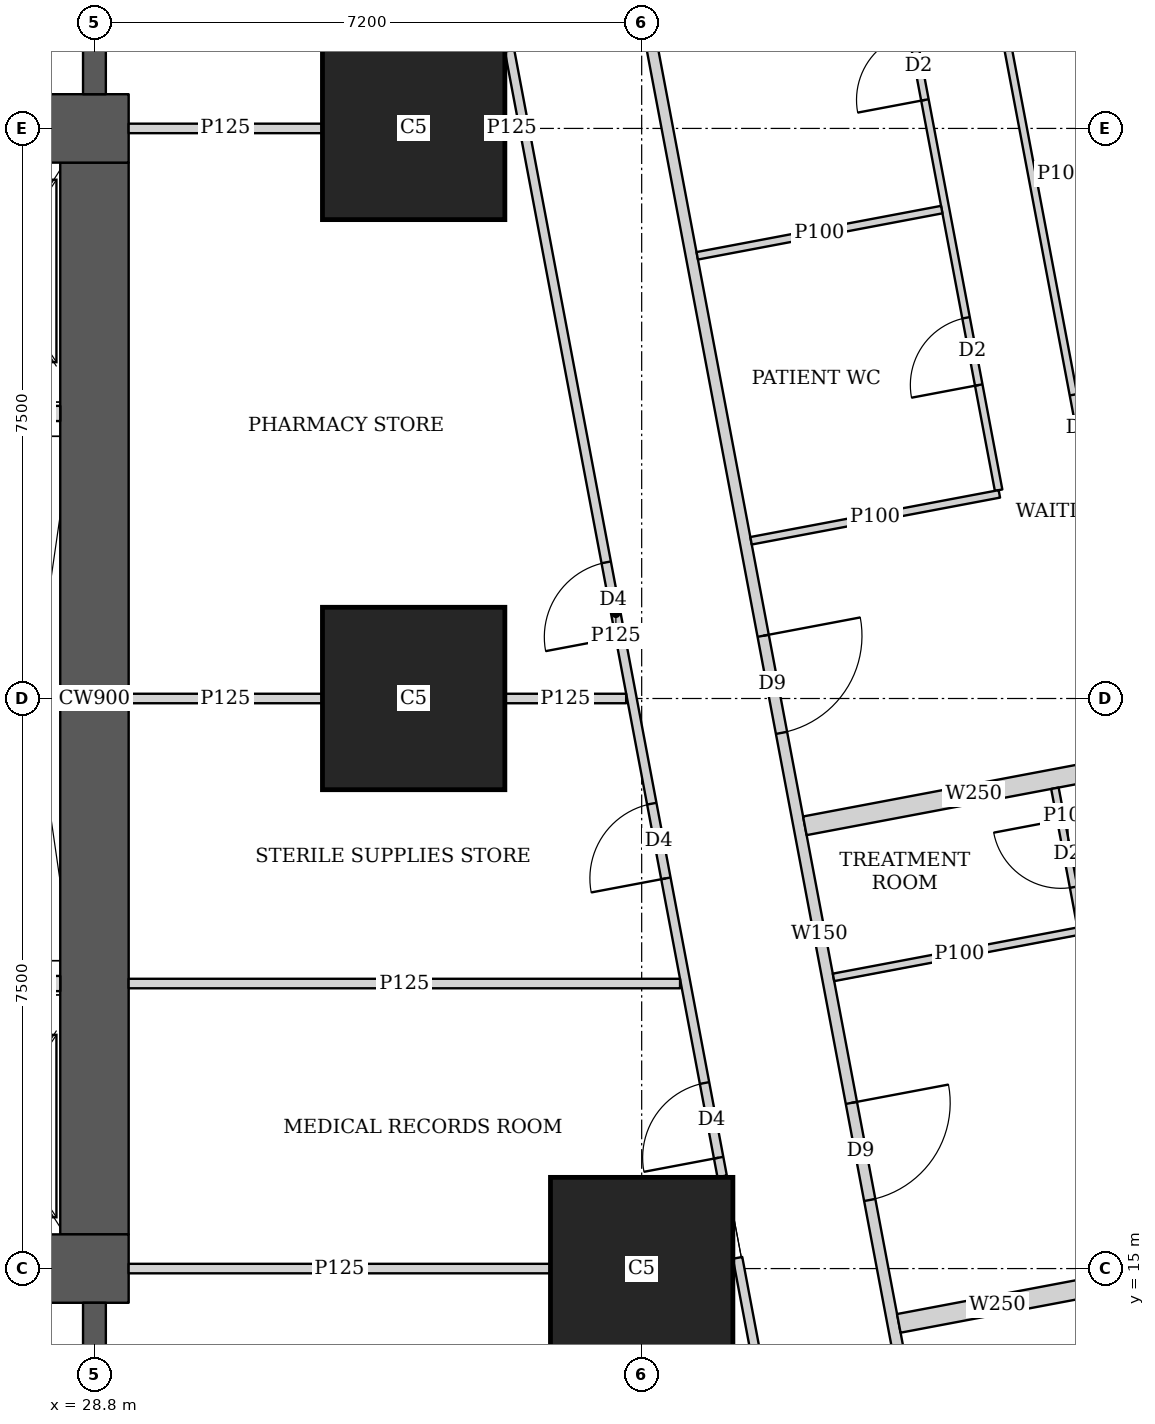
"""IFC4 building model, lengths in metres.
Left out: names, types, materials, properties, quantities, classifications, styles, units other than length and angle.
Written with IfcOpenShell. Run it as: python <this file> out.ifc"""

import sys

from ifc_helpers import new_model, si_unit, direction, frame, frame_2d, origin, origin_2d, place, context, subcontext, project, spatial, rectangle, extrude, element, fill, save


model = new_model("IFC4")
c1 = context("Model", 3, precision=1e-05, world=origin(), true_north=direction((0.0, 1.0)))
c2 = subcontext(c1, "Body", "Model", "MODEL_VIEW")
j1 = project(units=[si_unit("LENGTHUNIT", "METRE"), si_unit("PLANEANGLEUNIT", "RADIAN")], contexts=[c1])
p1 = place(None, origin())
s1 = spatial("IfcSite", under=j1, at=p1, CompositionType="ELEMENT")
p2 = place(p1, origin())
s2 = spatial("IfcBuilding", under=s1, at=p2, CompositionType="ELEMENT")
p3 = place(p2, frame((0.0, 0.0, 10.1)))
s3 = spatial("IfcBuildingStorey", under=s2, at=p3, CompositionType="ELEMENT", Elevation=10.1)
for number, where, z_axis, x_axis in (
    (1, (36.0, 15.0, 0.0), (0.0, 0.0, 1.0), (1.0, 0.0, 0.0)),
    (2, (33.0, 22.5, 0.0), (0.0, 0.0, 1.0), (1.0, 0.0, 0.0)),
    (3, (33.0, 30.0, 0.0), (0.0, 0.0, 1.0), (1.0, 0.0, 0.0)),
):
    element("IfcColumn", number, at=place(p3, frame(where, z_axis=z_axis, x_axis=x_axis)), inside=s3, PredefinedType="COLUMN", context=c2, shape_type="SweptSolid", body=[
        extrude(rectangle(XDim=2.4, YDim=2.4, at=origin_2d()), origin(), (0.0, 0.0, 1.0), 4.5),
    ])
p4 = place(p3, frame((13.95, 15.0, 0.0), z_axis=(0.0, 0.0, 1.0), x_axis=(1.0, 0.0, 0.0)))
e4 = element("IfcWall", 4, at=p4, inside=s3, PredefinedType="SHEAR", context=c2, shape_type="SweptSolid", body=[
    extrude(rectangle(XDim=15.3, YDim=0.9, at=frame_2d((7.65, 0.0))), origin(), (0.0, 0.0, 1.0), 4.5),
])
p5 = place(p4, frame((4.45, 0.0, 0.0)))
e5 = element("IfcOpeningElement", 5, at=p5, cuts=e4, PredefinedType="OPENING", context=c2, shape_type="SweptSolid", body=[
    extrude(rectangle(XDim=1.8, YDim=2.1, at=frame_2d((0.9, 1.05))), frame((0.0, 0.46, 0.0), z_axis=(0.0, -1.0, 0.0), x_axis=(1.0, 0.0, 0.0)), (0.0, 0.0, 1.0), 0.92),
])
p6 = place(p4, frame((10.7, 0.0, 0.0)))
e6 = element("IfcOpeningElement", 6, at=p6, cuts=e4, PredefinedType="OPENING", context=c2, shape_type="SweptSolid", body=[
    extrude(rectangle(XDim=1.1, YDim=2.1, at=frame_2d((0.55, 1.05))), frame((0.0, 0.46, 0.0), z_axis=(0.0, -1.0, 0.0), x_axis=(1.0, 0.0, 0.0)), (0.0, 0.0, 1.0), 0.92),
])
p7 = place(p3, frame((13.95, 30.0, 0.0), z_axis=(0.0, 0.0, 1.0), x_axis=(1.0, 0.0, 0.0)))
e7 = element("IfcWall", 7, at=p7, inside=s3, PredefinedType="SHEAR", context=c2, shape_type="SweptSolid", body=[
    extrude(rectangle(XDim=15.3, YDim=0.9, at=frame_2d((7.65, 0.0))), origin(), (0.0, 0.0, 1.0), 4.5),
])
p8 = place(p7, frame((4.45, 0.0, 0.0)))
e8 = element("IfcOpeningElement", 8, at=p8, cuts=e7, PredefinedType="OPENING", context=c2, shape_type="SweptSolid", body=[
    extrude(rectangle(XDim=1.8, YDim=2.1, at=frame_2d((0.9, 1.05))), frame((0.0, 0.46, 0.0), z_axis=(0.0, -1.0, 0.0), x_axis=(1.0, 0.0, 0.0)), (0.0, 0.0, 1.0), 0.92),
])
p9 = place(p7, frame((10.7, 0.0, 0.0)))
e9 = element("IfcOpeningElement", 9, at=p9, cuts=e7, PredefinedType="OPENING", context=c2, shape_type="SweptSolid", body=[
    extrude(rectangle(XDim=1.1, YDim=2.1, at=frame_2d((0.55, 1.05))), frame((0.0, 0.46, 0.0), z_axis=(0.0, -1.0, 0.0), x_axis=(1.0, 0.0, 0.0)), (0.0, 0.0, 1.0), 0.92),
])
p10 = place(p3, frame((28.8, 15.45, 0.0), z_axis=(0.0, 0.0, 1.0), x_axis=(0.0, 1.0, 0.0)))
e10 = element("IfcWall", 10, at=p10, inside=s3, PredefinedType="SHEAR", context=c2, shape_type="SweptSolid", body=[
    extrude(rectangle(XDim=14.1, YDim=0.9, at=frame_2d((7.05, 0.0))), origin(), (0.0, 0.0, 1.0), 4.5),
])
for number, where, z_axis, x_axis in (
    (11, (28.8, 10.35, 0.0), (0.0, 0.0, 1.0), (0.0, 1.0, 0.0)),
    (12, (28.8, 30.45, 0.0), (0.0, 0.0, 1.0), (0.0, 1.0, 0.0)),
):
    element("IfcWall", number, at=place(p3, frame(where, z_axis=z_axis, x_axis=x_axis)), inside=s3, PredefinedType="SHEAR", context=c2, shape_type="SweptSolid", body=[
        extrude(rectangle(XDim=4.2, YDim=0.3, at=frame_2d((2.1, 0.0))), origin(), (0.0, 0.0, 1.0), 4.5),
    ])
p11 = place(p3, frame((35.151, 36.285, 0.0), z_axis=(0.0, 0.0, 1.0), x_axis=(0.18558085056, -0.982628998099, 0.0)))
e13 = element("IfcWall", 13, at=p11, inside=s3, PredefinedType="SOLIDWALL", context=c2, shape_type="SweptSolid", body=[
    extrude(rectangle(XDim=34.352, YDim=0.15, at=frame_2d((17.176, 0.0))), origin(), (0.0, 0.0, 1.0), 2.4),
])
p12 = place(p11, frame((13.189, 0.0, 0.0)))
e14 = element("IfcOpeningElement", 14, at=p12, cuts=e13, PredefinedType="OPENING", context=c2, shape_type="SweptSolid", body=[
    extrude(rectangle(XDim=1.3, YDim=2.1, at=frame_2d((0.65, 1.05))), frame((0.0, 0.085, 0.0), z_axis=(0.0, -1.0, 0.0), x_axis=(1.0, 0.0, 0.0)), (0.0, 0.0, 1.0), 0.17),
])
p13 = place(p11, frame((19.443, 0.0, 0.0)))
e15 = element("IfcOpeningElement", 15, at=p13, cuts=e13, PredefinedType="OPENING", context=c2, shape_type="SweptSolid", body=[
    extrude(rectangle(XDim=1.3, YDim=2.1, at=frame_2d((0.65, 1.05))), frame((0.0, 0.085, 0.0), z_axis=(0.0, -1.0, 0.0), x_axis=(1.0, 0.0, 0.0)), (0.0, 0.0, 1.0), 0.17),
])
p14 = place(p11, frame((25.444, 0.0, 0.0)))
e16 = element("IfcOpeningElement", 16, at=p14, cuts=e13, PredefinedType="OPENING", context=c2, shape_type="SweptSolid", body=[
    extrude(rectangle(XDim=1.3, YDim=2.1, at=frame_2d((0.65, 1.05))), frame((0.0, 0.085, 0.0), z_axis=(0.0, -1.0, 0.0), x_axis=(1.0, 0.0, 0.0)), (0.0, 0.0, 1.0), 0.17),
])
p15 = place(p3, frame((38.956, 40.92, 0.0), z_axis=(0.0, 0.0, 1.0), x_axis=(0.185636914727, -0.982618408077, 0.0)))
e17 = element("IfcWall", 17, at=p15, inside=s3, PredefinedType="PARTITIONING", context=c2, shape_type="SweptSolid", body=[
    extrude(rectangle(XDim=15.729, YDim=0.1, at=frame_2d((7.865, 0.0))), origin(), (0.0, 0.0, 1.0), 2.6),
])
p16 = place(p15, frame((14.679, 0.0, 0.0)))
e18 = element("IfcOpeningElement", 18, at=p16, cuts=e17, PredefinedType="OPENING", context=c2, shape_type="SweptSolid", body=[
    extrude(rectangle(XDim=0.9, YDim=2.1, at=frame_2d((0.45, 1.05))), frame((0.0, 0.06, 0.0), z_axis=(0.0, -1.0, 0.0), x_axis=(1.0, 0.0, 0.0)), (0.0, 0.0, 1.0), 0.12),
])
p17 = place(p15, frame((9.0, 0.0, 0.0)))
e19 = element("IfcOpeningElement", 19, at=p17, cuts=e17, PredefinedType="OPENING", context=c2, shape_type="SweptSolid", body=[
    extrude(rectangle(XDim=0.9, YDim=2.1, at=frame_2d((0.45, 1.05))), frame((0.0, 0.06, 0.0), z_axis=(0.0, -1.0, 0.0), x_axis=(1.0, 0.0, 0.0)), (0.0, 0.0, 1.0), 0.12),
])
p18 = place(p15, frame((3.231, 0.0, 0.0)))
e20 = element("IfcOpeningElement", 20, at=p18, cuts=e17, PredefinedType="OPENING", context=c2, shape_type="SweptSolid", body=[
    extrude(rectangle(XDim=0.9, YDim=2.1, at=frame_2d((0.45, 1.05))), frame((0.0, 0.06, 0.0), z_axis=(0.0, -1.0, 0.0), x_axis=(1.0, 0.0, 0.0)), (0.0, 0.0, 1.0), 0.12),
])
p19 = place(p3, frame((36.842, 45.65, 0.0), z_axis=(0.0, 0.0, 1.0), x_axis=(0.185559483963, -0.982633033188, 0.0)))
e21 = element("IfcWall", 21, at=p19, inside=s3, PredefinedType="PARTITIONING", context=c2, shape_type="SweptSolid", body=[
    extrude(rectangle(XDim=20.77, YDim=0.1, at=frame_2d((10.385, 0.0))), origin(), (0.0, 0.0, 1.0), 2.4),
])
p20 = place(p19, frame((18.462, 0.0, 0.0)))
e22 = element("IfcOpeningElement", 22, at=p20, cuts=e21, PredefinedType="OPENING", context=c2, shape_type="SweptSolid", body=[
    extrude(rectangle(XDim=0.9, YDim=2.1, at=frame_2d((0.45, 1.05))), frame((0.0, 0.06, 0.0), z_axis=(0.0, -1.0, 0.0), x_axis=(1.0, 0.0, 0.0)), (0.0, 0.0, 1.0), 0.12),
])
p21 = place(p19, frame((14.645, 0.0, 0.0)))
e23 = element("IfcOpeningElement", 23, at=p21, cuts=e21, PredefinedType="OPENING", context=c2, shape_type="SweptSolid", body=[
    extrude(rectangle(XDim=0.9, YDim=2.1, at=frame_2d((0.45, 1.05))), frame((0.0, 0.06, 0.0), z_axis=(0.0, -1.0, 0.0), x_axis=(1.0, 0.0, 0.0)), (0.0, 0.0, 1.0), 0.12),
])
p22 = place(p19, frame((5.655, 0.0, 0.0)))
e24 = element("IfcOpeningElement", 24, at=p22, cuts=e21, PredefinedType="OPENING", context=c2, shape_type="SweptSolid", body=[
    extrude(rectangle(XDim=0.9, YDim=2.1, at=frame_2d((0.45, 1.05))), frame((0.0, 0.06, 0.0), z_axis=(0.0, -1.0, 0.0), x_axis=(1.0, 0.0, 0.0)), (0.0, 0.0, 1.0), 0.12),
])
p23 = place(p3, frame((41.87, 29.459, 0.0), z_axis=(0.0, 0.0, 1.0), x_axis=(-0.982722777639, -0.185083608972, 0.0)))
e25 = element("IfcWall", 25, at=p23, inside=s3, PredefinedType="PARTITIONING", context=c2, shape_type="SweptSolid", body=[
    extrude(rectangle(XDim=0.686, YDim=0.1, at=frame_2d((0.343, 0.0))), origin(), (0.0, 0.0, 1.0), 2.6),
])
p24 = place(p3, frame((39.948, 28.932, 0.0), z_axis=(0.0, 0.0, 1.0), x_axis=(-0.982610347627, -0.185679575441, 0.0)))
e26 = element("IfcWall", 26, at=p24, inside=s3, PredefinedType="PARTITIONING", context=c2, shape_type="SweptSolid", body=[
    extrude(rectangle(XDim=3.274, YDim=0.1, at=frame_2d((1.637, 0.0))), origin(), (0.0, 0.0, 1.0), 2.6),
])
p25 = place(p3, frame((40.706, 25.192, 0.0), z_axis=(0.0, 0.0, 1.0), x_axis=(-0.982633623707, -0.185556356831, 0.0)))
e27 = element("IfcWall", 27, at=p25, inside=s3, PredefinedType="PARTITIONING", context=c2, shape_type="SweptSolid", body=[
    extrude(rectangle(XDim=3.325, YDim=0.1, at=frame_2d((1.663, 0.0))), origin(), (0.0, 0.0, 1.0), 4.2),
])
p26 = place(p3, frame((41.437, 21.319, 0.0), z_axis=(0.0, 0.0, 1.0), x_axis=(0.186029078128, -0.982544239254, 0.0)))
e28 = element("IfcWall", 28, at=p26, inside=s3, PredefinedType="PARTITIONING", context=c2, shape_type="SweptSolid", body=[
    extrude(rectangle(XDim=1.854, YDim=0.1, at=frame_2d((0.927, 0.0))), origin(), (0.0, 0.0, 1.0), 4.2),
])
p27 = place(p26, frame((0.424, 0.0, 0.0)))
e29 = element("IfcOpeningElement", 29, at=p27, cuts=e28, PredefinedType="OPENING", context=c2, shape_type="SweptSolid", body=[
    extrude(rectangle(XDim=0.9, YDim=2.1, at=frame_2d((0.45, 1.05))), frame((0.0, 0.06, 0.0), z_axis=(0.0, -1.0, 0.0), x_axis=(1.0, 0.0, 0.0)), (0.0, 0.0, 1.0), 0.12),
])
p28 = place(p3, frame((41.84, 19.457, 0.0), z_axis=(0.0, 0.0, 1.0), x_axis=(-0.98264623159, -0.185489577987, 0.0)))
e30 = element("IfcWall", 30, at=p28, inside=s3, PredefinedType="PARTITIONING", context=c2, shape_type="SweptSolid", body=[
    extrude(rectangle(XDim=3.375, YDim=0.1, at=frame_2d((1.688, 0.0))), origin(), (0.0, 0.0, 1.0), 4.2),
])
p29 = place(p3, frame((42.593, 21.665, 0.0), z_axis=(0.0, 0.0, 1.0), x_axis=(-0.982612837616, -0.185666398014, 0.0)))
e31 = element("IfcWall", 31, at=p29, inside=s3, PredefinedType="SOLIDWALL", context=c2, shape_type="SweptSolid", body=[
    extrude(rectangle(XDim=4.525, YDim=0.25, at=frame_2d((2.262, 0.0))), origin(), (0.0, 0.0, 1.0), 2.6),
])
p30 = place(p3, frame((41.976, 14.769, 0.0), z_axis=(0.0, 0.0, 1.0), x_axis=(-0.982610412957, -0.185679229715, 0.0)))
e32 = element("IfcWall", 32, at=p30, inside=s3, PredefinedType="SOLIDWALL", context=c2, shape_type="SweptSolid", body=[
    extrude(rectangle(XDim=2.639, YDim=0.25, at=frame_2d((1.319, 0.0))), origin(), (0.0, 0.0, 1.0), 2.6),
])
p31 = place(p3, frame((38.202, 10.163, 0.0), z_axis=(0.0, 0.0, 1.0), x_axis=(-0.185539561605, 0.982636795097, 0.0)))
e33 = element("IfcWall", 33, at=p31, inside=s3, PredefinedType="PARTITIONING", context=c2, shape_type="SweptSolid", body=[
    extrude(rectangle(XDim=5.066, YDim=0.125, at=frame_2d((2.533, 0.0))), origin(), (0.0, 0.0, 1.0), 2.6),
])
p32 = place(p31, frame((0.708, 0.0, 0.0)))
e34 = element("IfcOpeningElement", 34, at=p32, cuts=e33, PredefinedType="OPENING", context=c2, shape_type="SweptSolid", body=[
    extrude(rectangle(XDim=1.0, YDim=2.1, at=frame_2d((0.5, 1.05))), frame((0.0, 0.073, 0.0), z_axis=(0.0, -1.0, 0.0), x_axis=(1.0, 0.0, 0.0)), (0.0, 0.0, 1.0), 0.145),
])
p33 = place(p3, frame((37.059, 16.213, 0.0), z_axis=(0.0, 0.0, 1.0), x_axis=(-0.185585225745, 0.982628171785, 0.0)))
e35 = element("IfcWall", 35, at=p33, inside=s3, PredefinedType="PARTITIONING", context=c2, shape_type="SweptSolid", body=[
    extrude(rectangle(XDim=15.072, YDim=0.125, at=frame_2d((7.536, 0.0))), origin(), (0.0, 0.0, 1.0), 2.6),
])
p34 = place(p33, frame((7.221, 0.0, 0.0)))
e36 = element("IfcOpeningElement", 36, at=p34, cuts=e35, PredefinedType="OPENING", context=c2, shape_type="SweptSolid", body=[
    extrude(rectangle(XDim=1.0, YDim=2.1, at=frame_2d((0.5, 1.05))), frame((0.0, 0.073, 0.0), z_axis=(0.0, -1.0, 0.0), x_axis=(1.0, 0.0, 0.0)), (0.0, 0.0, 1.0), 0.145),
])
p35 = place(p33, frame((0.25, 0.0, 0.0)))
e37 = element("IfcOpeningElement", 37, at=p35, cuts=e35, PredefinedType="OPENING", context=c2, shape_type="SweptSolid", body=[
    extrude(rectangle(XDim=1.0, YDim=2.1, at=frame_2d((0.5, 1.05))), frame((0.0, 0.073, 0.0), z_axis=(0.0, -1.0, 0.0), x_axis=(1.0, 0.0, 0.0)), (0.0, 0.0, 1.0), 0.145),
])
p36 = place(p33, frame((3.99, 0.0, 0.0)))
e38 = element("IfcOpeningElement", 38, at=p36, cuts=e35, PredefinedType="OPENING", context=c2, shape_type="SweptSolid", body=[
    extrude(rectangle(XDim=1.0, YDim=2.1, at=frame_2d((0.5, 1.05))), frame((0.0, 0.073, 0.0), z_axis=(0.0, -1.0, 0.0), x_axis=(1.0, 0.0, 0.0)), (0.0, 0.0, 1.0), 0.145),
])
p37 = place(p3, frame((29.25, 15.0, 0.0), z_axis=(0.0, 0.0, 1.0), x_axis=(1.0, 0.0, 0.0)))
e39 = element("IfcWall", 39, at=p37, inside=s3, PredefinedType="PARTITIONING", context=c2, shape_type="SweptSolid", body=[
    extrude(rectangle(XDim=5.549, YDim=0.125, at=frame_2d((2.774, 0.0))), origin(), (0.0, 0.0, 1.0), 4.2),
])
p38 = place(p3, frame((29.25, 22.5, 0.0), z_axis=(0.0, 0.0, 1.0), x_axis=(1.0, 0.0, 0.0)))
e40 = element("IfcWall", 40, at=p38, inside=s3, PredefinedType="PARTITIONING", context=c2, shape_type="SweptSolid", body=[
    extrude(rectangle(XDim=2.549, YDim=0.125, at=frame_2d((1.274, 0.0))), origin(), (0.0, 0.0, 1.0), 2.6),
])
p39 = place(p3, frame((34.201, 22.5, 0.0), z_axis=(0.0, 0.0, 1.0), x_axis=(1.0, 0.0, 0.0)))
e41 = element("IfcWall", 41, at=p39, inside=s3, PredefinedType="PARTITIONING", context=c2, shape_type="SweptSolid", body=[
    extrude(rectangle(XDim=1.595, YDim=0.125, at=frame_2d((0.797, 0.0))), origin(), (0.0, 0.0, 1.0), 2.6),
])
p40 = place(p3, frame((29.25, 30.0, 0.0), z_axis=(0.0, 0.0, 1.0), x_axis=(1.0, 0.0, 0.0)))
e42 = element("IfcWall", 42, at=p40, inside=s3, PredefinedType="PARTITIONING", context=c2, shape_type="SweptSolid", body=[
    extrude(rectangle(XDim=2.549, YDim=0.125, at=frame_2d((1.274, 0.0))), origin(), (0.0, 0.0, 1.0), 4.2),
])
p41 = place(p3, frame((34.201, 30.0, 0.0), z_axis=(0.0, 0.0, 1.0), x_axis=(1.0, 0.0, 0.0)))
e43 = element("IfcWall", 43, at=p41, inside=s3, PredefinedType="PARTITIONING", context=c2, shape_type="SweptSolid", body=[
    extrude(rectangle(XDim=0.178, YDim=0.125, at=frame_2d((0.089, 0.0))), origin(), (0.0, 0.0, 1.0), 2.6),
])
p42 = place(p3, frame((29.25, 18.75, 0.0), z_axis=(0.0, 0.0, 1.0), x_axis=(1.0, 0.0, 0.0)))
e44 = element("IfcWall", 44, at=p42, inside=s3, PredefinedType="PARTITIONING", context=c2, shape_type="SweptSolid", body=[
    extrude(rectangle(XDim=7.255, YDim=0.125, at=frame_2d((3.627, 0.0))), origin(), (0.0, 0.0, 1.0), 4.2),
])
for number, where, z_axis, x_axis in (
    (45, (27.4, 18.75, 0.0), (0.0, 0.0, 1.0), (1.0, 0.0, 0.0)),
    (46, (27.4, 26.25, 0.0), (0.0, 0.0, 1.0), (1.0, 0.0, 0.0)),
):
    element("IfcWall", number, at=place(p3, frame(where, z_axis=z_axis, x_axis=x_axis)), inside=s3, PredefinedType="SOLIDWALL", context=c2, shape_type="SweptSolid", body=[
        extrude(rectangle(XDim=0.95, YDim=0.2, at=frame_2d((0.475, 0.0))), origin(), (0.0, 0.0, 1.0), 4.2),
    ])
p43 = place(p16, origin())
e47 = element("IfcDoor", 47, at=p43, inside=s3, OperationType="SINGLE_SWING_RIGHT", PredefinedType="DOOR", context=c2, shape_type="SweptSolid", body=[
    extrude(rectangle(XDim=0.9, YDim=2.1, at=frame_2d((0.45, 1.05))), frame((0.0, 0.025, 0.0), z_axis=(0.0, -1.0, 0.0), x_axis=(1.0, 0.0, 0.0)), (0.0, 0.0, 1.0), 0.05),
])
fill(e18, e47)
p44 = place(p20, origin())
e48 = element("IfcDoor", 48, at=p44, inside=s3, OperationType="SINGLE_SWING_LEFT", PredefinedType="DOOR", context=c2, shape_type="SweptSolid", body=[
    extrude(rectangle(XDim=0.9, YDim=2.1, at=frame_2d((0.45, 1.05))), frame((0.0, 0.025, 0.0), z_axis=(0.0, -1.0, 0.0), x_axis=(1.0, 0.0, 0.0)), (0.0, 0.0, 1.0), 0.05),
])
fill(e22, e48)
p45 = place(p21, origin())
e49 = element("IfcDoor", 49, at=p45, inside=s3, OperationType="SINGLE_SWING_LEFT", PredefinedType="DOOR", context=c2, shape_type="SweptSolid", body=[
    extrude(rectangle(XDim=0.9, YDim=2.1, at=frame_2d((0.45, 1.05))), frame((0.0, 0.025, 0.0), z_axis=(0.0, -1.0, 0.0), x_axis=(1.0, 0.0, 0.0)), (0.0, 0.0, 1.0), 0.05),
])
fill(e23, e49)
p46 = place(p12, origin())
e50 = element("IfcDoor", 50, at=p46, inside=s3, OperationType="DOUBLE_DOOR_SINGLE_SWING", PredefinedType="DOOR", context=c2, shape_type="SweptSolid", body=[
    extrude(rectangle(XDim=1.3, YDim=2.1, at=frame_2d((0.65, 1.05))), frame((0.0, 0.025, 0.0), z_axis=(0.0, -1.0, 0.0), x_axis=(1.0, 0.0, 0.0)), (0.0, 0.0, 1.0), 0.05),
])
fill(e14, e50)
p47 = place(p27, origin())
e51 = element("IfcDoor", 51, at=p47, inside=s3, OperationType="SINGLE_SWING_RIGHT", PredefinedType="DOOR", context=c2, shape_type="SweptSolid", body=[
    extrude(rectangle(XDim=0.9, YDim=2.1, at=frame_2d((0.45, 1.05))), frame((0.0, 0.025, 0.0), z_axis=(0.0, -1.0, 0.0), x_axis=(1.0, 0.0, 0.0)), (0.0, 0.0, 1.0), 0.05),
])
fill(e29, e51)
p48 = place(p13, origin())
e52 = element("IfcDoor", 52, at=p48, inside=s3, OperationType="DOUBLE_DOOR_SINGLE_SWING", PredefinedType="DOOR", context=c2, shape_type="SweptSolid", body=[
    extrude(rectangle(XDim=1.3, YDim=2.1, at=frame_2d((0.65, 1.05))), frame((0.0, 0.025, 0.0), z_axis=(0.0, -1.0, 0.0), x_axis=(1.0, 0.0, 0.0)), (0.0, 0.0, 1.0), 0.05),
])
fill(e15, e52)
p49 = place(p34, origin())
e53 = element("IfcDoor", 53, at=p49, inside=s3, OperationType="SINGLE_SWING_LEFT", PredefinedType="DOOR", context=c2, shape_type="SweptSolid", body=[
    extrude(rectangle(XDim=1.0, YDim=2.1, at=frame_2d((0.5, 1.05))), frame((0.0, 0.025, 0.0), z_axis=(0.0, -1.0, 0.0), x_axis=(1.0, 0.0, 0.0)), (0.0, 0.0, 1.0), 0.05),
])
fill(e36, e53)
p50 = place(p35, origin())
e54 = element("IfcDoor", 54, at=p50, inside=s3, OperationType="SINGLE_SWING_LEFT", PredefinedType="DOOR", context=c2, shape_type="SweptSolid", body=[
    extrude(rectangle(XDim=1.0, YDim=2.1, at=frame_2d((0.5, 1.05))), frame((0.0, 0.025, 0.0), z_axis=(0.0, -1.0, 0.0), x_axis=(1.0, 0.0, 0.0)), (0.0, 0.0, 1.0), 0.05),
])
fill(e37, e54)
p51 = place(p36, origin())
e55 = element("IfcDoor", 55, at=p51, inside=s3, OperationType="SINGLE_SWING_LEFT", PredefinedType="DOOR", context=c2, shape_type="SweptSolid", body=[
    extrude(rectangle(XDim=1.0, YDim=2.1, at=frame_2d((0.5, 1.05))), frame((0.0, 0.025, 0.0), z_axis=(0.0, -1.0, 0.0), x_axis=(1.0, 0.0, 0.0)), (0.0, 0.0, 1.0), 0.05),
])
fill(e38, e55)
save(model, sys.argv[1])
